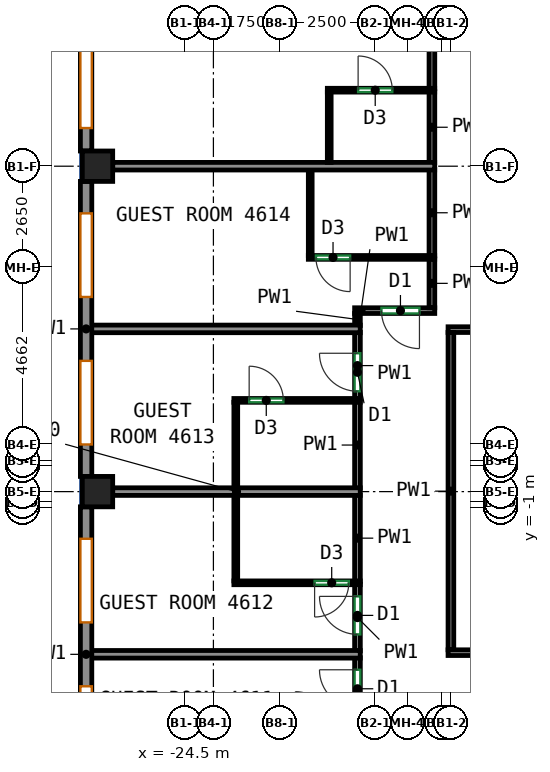
"""IFC4 building model, lengths in metres.
Left out: names, types, materials, properties, quantities, classifications, styles, units other than length and angle.
Written with IfcOpenShell. Run it as: python <this file> out.ifc"""

import sys

from ifc_helpers import new_model, si_unit, direction, frame, frame_2d, origin, origin_2d, place, context, subcontext, project, spatial, rectangle, extrude, source, transform, mapped, element, fill, save


model = new_model("IFC4")
c1 = context("Model", 3, precision=1e-05, world=origin(), true_north=direction((0.0, 1.0)))
c2 = subcontext(c1, "Body", "Model", "MODEL_VIEW")
j1 = project(units=[si_unit("LENGTHUNIT", "METRE"), si_unit("PLANEANGLEUNIT", "RADIAN")], contexts=[c1])
p1 = place(None, origin())
s1 = spatial("IfcSite", under=j1, at=p1, CompositionType="ELEMENT")
p2 = place(p1, origin())
s2 = spatial("IfcBuilding", under=s1, at=p2, CompositionType="ELEMENT")
p3 = place(p2, frame((0.0, 0.0, 192.3)))
s3 = spatial("IfcBuildingStorey", under=s2, at=p3, CompositionType="ELEMENT", Elevation=192.3)
m1 = source(origin(), c2, "Body", "SweptSolid", [
    extrude(rectangle(XDim=0.8, YDim=0.8, at=origin_2d()), origin(), (0.0, 0.0, 1.0), 3.0),
])
for number, where, z_axis, x_axis in (
    (1, (-26.8, -0.562, 0.0), (0.0, 0.0, 1.0), (1.0, 0.0, 0.0)),
    (2, (-26.8, 8.0, 0.0), (0.0, 0.0, 1.0), (1.0, 0.0, 0.0)),
):
    element("IfcColumn", number, at=place(p3, frame(where, z_axis=z_axis, x_axis=x_axis)), inside=s3, PredefinedType="COLUMN", context=c2, shape_type="MappedRepresentation", body=[
        mapped(m1, transform((0.0, 0.0, 0.0))),
    ])
m2 = source(origin(), c2, "Body", "SweptSolid", [
    extrude(rectangle(XDim=13.632, YDim=0.3, at=frame_2d((6.816, 0.0))), origin(), (0.0, 0.0, 1.0), 3.0),
])
p4 = place(p3, frame((-27.1, 22.032, 0.0), z_axis=(0.0, 0.0, 1.0), x_axis=(0.0, -1.0, 0.0)))
e3 = element("IfcWall", 3, at=p4, inside=s3, PredefinedType="SOLIDWALL", context=c2, shape_type="MappedRepresentation", body=[
    mapped(m2, transform((0.0, 0.0, 0.0))),
])
p5 = place(p4, frame((0.604, 0.0, 0.85)))
e4 = element("IfcOpeningElement", 4, at=p5, cuts=e3, PredefinedType="OPENING", context=c2, shape_type="SweptSolid", body=[
    extrude(rectangle(XDim=2.2, YDim=1.95, at=frame_2d((1.1, 0.975))), frame((0.0, 0.16, 0.0), z_axis=(0.0, -1.0, 0.0), x_axis=(1.0, 0.0, 0.0)), (0.0, 0.0, 1.0), 0.32),
])
p6 = place(p4, frame((4.012, 0.0, 0.85)))
e5 = element("IfcOpeningElement", 5, at=p6, cuts=e3, PredefinedType="OPENING", context=c2, shape_type="SweptSolid", body=[
    extrude(rectangle(XDim=2.2, YDim=1.95, at=frame_2d((1.1, 0.975))), frame((0.0, 0.16, 0.0), z_axis=(0.0, -1.0, 0.0), x_axis=(1.0, 0.0, 0.0)), (0.0, 0.0, 1.0), 0.32),
])
p7 = place(p4, frame((7.42, 0.0, 0.85)))
e6 = element("IfcOpeningElement", 6, at=p7, cuts=e3, PredefinedType="OPENING", context=c2, shape_type="SweptSolid", body=[
    extrude(rectangle(XDim=2.2, YDim=1.95, at=frame_2d((1.1, 0.975))), frame((0.0, 0.16, 0.0), z_axis=(0.0, -1.0, 0.0), x_axis=(1.0, 0.0, 0.0)), (0.0, 0.0, 1.0), 0.32),
])
p8 = place(p4, frame((10.828, 0.0, 0.85)))
e7 = element("IfcOpeningElement", 7, at=p8, cuts=e3, PredefinedType="OPENING", context=c2, shape_type="SweptSolid", body=[
    extrude(rectangle(XDim=2.2, YDim=1.95, at=frame_2d((1.1, 0.975))), frame((0.0, 0.16, 0.0), z_axis=(0.0, -1.0, 0.0), x_axis=(1.0, 0.0, 0.0)), (0.0, 0.0, 1.0), 0.32),
])
m3 = source(origin(), c2, "Body", "SweptSolid", [
    extrude(rectangle(XDim=7.763, YDim=0.3, at=frame_2d((3.881, 0.0))), origin(), (0.0, 0.0, 1.0), 3.0),
])
p9 = place(p3, frame((-27.1, 7.6, 0.0), z_axis=(0.0, 0.0, 1.0), x_axis=(0.0, -1.0, 0.0)))
e8 = element("IfcWall", 8, at=p9, inside=s3, PredefinedType="SOLIDWALL", context=c2, shape_type="MappedRepresentation", body=[
    mapped(m3, transform((0.0, 0.0, 0.0))),
])
p10 = place(p9, frame((0.841, 0.0, 0.85)))
e9 = element("IfcOpeningElement", 9, at=p10, cuts=e8, PredefinedType="OPENING", context=c2, shape_type="SweptSolid", body=[
    extrude(rectangle(XDim=2.2, YDim=1.95, at=frame_2d((1.1, 0.975))), frame((0.0, 0.16, 0.0), z_axis=(0.0, -1.0, 0.0), x_axis=(1.0, 0.0, 0.0)), (0.0, 0.0, 1.0), 0.32),
])
p11 = place(p9, frame((4.722, 0.0, 0.85)))
e10 = element("IfcOpeningElement", 10, at=p11, cuts=e8, PredefinedType="OPENING", context=c2, shape_type="SweptSolid", body=[
    extrude(rectangle(XDim=2.2, YDim=1.95, at=frame_2d((1.1, 0.975))), frame((0.0, 0.16, 0.0), z_axis=(0.0, -1.0, 0.0), x_axis=(1.0, 0.0, 0.0)), (0.0, 0.0, 1.0), 0.32),
])
p12 = place(p3, frame((-27.1, -0.962, 0.0), z_axis=(0.0, 0.0, 1.0), x_axis=(0.0, -1.0, 0.0)))
e11 = element("IfcWall", 11, at=p12, inside=s3, PredefinedType="SOLIDWALL", context=c2, shape_type="MappedRepresentation", body=[
    mapped(m3, transform((0.0, 0.0, 0.0))),
])
p13 = place(p12, frame((0.841, 0.0, 0.85)))
e12 = element("IfcOpeningElement", 12, at=p13, cuts=e11, PredefinedType="OPENING", context=c2, shape_type="SweptSolid", body=[
    extrude(rectangle(XDim=2.2, YDim=1.95, at=frame_2d((1.1, 0.975))), frame((0.0, 0.16, 0.0), z_axis=(0.0, -1.0, 0.0), x_axis=(1.0, 0.0, 0.0)), (0.0, 0.0, 1.0), 0.32),
])
p14 = place(p12, frame((4.722, 0.0, 0.85)))
e13 = element("IfcOpeningElement", 13, at=p14, cuts=e11, PredefinedType="OPENING", context=c2, shape_type="SweptSolid", body=[
    extrude(rectangle(XDim=2.2, YDim=1.95, at=frame_2d((1.1, 0.975))), frame((0.0, 0.16, 0.0), z_axis=(0.0, -1.0, 0.0), x_axis=(1.0, 0.0, 0.0)), (0.0, 0.0, 1.0), 0.32),
])
p15 = place(p3, frame((-19.959, -6.685, 0.0), z_axis=(0.0, 0.0, 1.0), x_axis=(0.0, 1.0, 0.0)))
e14 = element("IfcWall", 14, at=p15, inside=s3, PredefinedType="PARTITIONING", context=c2, shape_type="SweptSolid", body=[
    extrude(rectangle(XDim=1.752, YDim=0.15, at=frame_2d((0.876, 0.0))), origin(), (0.0, 0.0, 1.0), 3.0),
])
p16 = place(p15, frame((0.435, 0.0, 0.0)))
e15 = element("IfcOpeningElement", 15, at=p16, cuts=e14, PredefinedType="OPENING", context=c2, shape_type="SweptSolid", body=[
    extrude(rectangle(XDim=1.0, YDim=2.1, at=frame_2d((0.5, 1.05))), frame((0.0, 0.085, 0.0), z_axis=(0.0, -1.0, 0.0), x_axis=(1.0, 0.0, 0.0)), (0.0, 0.0, 1.0), 0.17),
])
p17 = place(p3, frame((-19.959, -4.753, 0.0), z_axis=(0.0, 0.0, 1.0), x_axis=(0.0, 1.0, 0.0)))
e16 = element("IfcWall", 16, at=p17, inside=s3, PredefinedType="PARTITIONING", context=c2, shape_type="SweptSolid", body=[
    extrude(rectangle(XDim=1.751, YDim=0.15, at=frame_2d((0.875, 0.0))), origin(), (0.0, 0.0, 1.0), 3.0),
])
p18 = place(p17, frame((0.434, 0.0, 0.0)))
e17 = element("IfcOpeningElement", 17, at=p18, cuts=e16, PredefinedType="OPENING", context=c2, shape_type="SweptSolid", body=[
    extrude(rectangle(XDim=1.0, YDim=2.1, at=frame_2d((0.5, 1.05))), frame((0.0, 0.085, 0.0), z_axis=(0.0, -1.0, 0.0), x_axis=(1.0, 0.0, 0.0)), (0.0, 0.0, 1.0), 0.17),
])
p19 = place(p3, frame((-19.959, -2.922, 0.0), z_axis=(0.0, 0.0, 1.0), x_axis=(0.0, 1.0, 0.0)))
e18 = element("IfcWall", 18, at=p19, inside=s3, PredefinedType="PARTITIONING", context=c2, shape_type="SweptSolid", body=[
    extrude(rectangle(XDim=2.27, YDim=0.15, at=frame_2d((1.135, 0.0))), origin(), (0.0, 0.0, 1.0), 3.0),
])
p20 = place(p3, frame((-19.959, 1.878, 0.0), z_axis=(0.0, 0.0, 1.0), x_axis=(0.0, 1.0, 0.0)))
e19 = element("IfcWall", 19, at=p20, inside=s3, PredefinedType="PARTITIONING", context=c2, shape_type="SweptSolid", body=[
    extrude(rectangle(XDim=1.751, YDim=0.15, at=frame_2d((0.875, 0.0))), origin(), (0.0, 0.0, 1.0), 3.0),
])
p21 = place(p20, frame((0.2, 0.0, 0.0)))
e20 = element("IfcOpeningElement", 20, at=p21, cuts=e19, PredefinedType="OPENING", context=c2, shape_type="SweptSolid", body=[
    extrude(rectangle(XDim=1.0, YDim=2.1, at=frame_2d((0.5, 1.05))), frame((0.0, 0.085, 0.0), z_axis=(0.0, -1.0, 0.0), x_axis=(1.0, 0.0, 0.0)), (0.0, 0.0, 1.0), 0.17),
])
p22 = place(p3, frame((-19.959, -0.472, 0.0), z_axis=(0.0, 0.0, 1.0), x_axis=(0.0, 1.0, 0.0)))
e21 = element("IfcWall", 21, at=p22, inside=s3, PredefinedType="PARTITIONING", context=c2, shape_type="SweptSolid", body=[
    extrude(rectangle(XDim=2.27, YDim=0.15, at=frame_2d((1.135, 0.0))), origin(), (0.0, 0.0, 1.0), 3.0),
])
p23 = place(p3, frame((-19.959, 3.809, 0.0), z_axis=(0.0, 0.0, 1.0), x_axis=(0.0, 1.0, 0.0)))
e22 = element("IfcWall", 22, at=p23, inside=s3, PredefinedType="PARTITIONING", context=c2, shape_type="SweptSolid", body=[
    extrude(rectangle(XDim=0.316, YDim=0.15, at=frame_2d((0.158, 0.0))), origin(), (0.0, 0.0, 1.0), 3.0),
])
p24 = place(p3, frame((-17.925, 4.2, 0.0), z_axis=(0.0, 0.0, 1.0), x_axis=(-1.0, 0.0, 0.0)))
e23 = element("IfcWall", 23, at=p24, inside=s3, PredefinedType="PARTITIONING", context=c2, shape_type="SweptSolid", body=[
    extrude(rectangle(XDim=2.109, YDim=0.15, at=frame_2d((1.054, 0.0))), origin(), (0.0, 0.0, 1.0), 3.0),
])
p25 = place(p24, frame((0.403, 0.0, 0.0)))
e24 = element("IfcOpeningElement", 24, at=p25, cuts=e23, PredefinedType="OPENING", context=c2, shape_type="SweptSolid", body=[
    extrude(rectangle(XDim=1.0, YDim=2.1, at=frame_2d((0.5, 1.05))), frame((0.0, 0.085, 0.0), z_axis=(0.0, -1.0, 0.0), x_axis=(1.0, 0.0, 0.0)), (0.0, 0.0, 1.0), 0.17),
])
p26 = place(p3, frame((-18.0, 4.275, 0.0), z_axis=(0.0, 0.0, 1.0), x_axis=(0.0, 1.0, 0.0)))
e25 = element("IfcWall", 25, at=p26, inside=s3, PredefinedType="PARTITIONING", context=c2, shape_type="SweptSolid", body=[
    extrude(rectangle(XDim=1.285, YDim=0.15, at=frame_2d((0.643, 0.0))), origin(), (0.0, 0.0, 1.0), 3.0),
])
p27 = place(p3, frame((-18.0, 5.64, 0.0), z_axis=(0.0, 0.0, 1.0), x_axis=(0.0, 1.0, 0.0)))
e26 = element("IfcWall", 26, at=p27, inside=s3, PredefinedType="PARTITIONING", context=c2, shape_type="SweptSolid", body=[
    extrude(rectangle(XDim=2.27, YDim=0.15, at=frame_2d((1.135, 0.0))), origin(), (0.0, 0.0, 1.0), 3.0),
])
p28 = place(p3, frame((-18.0, 10.04, 0.0), z_axis=(0.0, 0.0, 1.0), x_axis=(0.0, 1.0, 0.0)))
e27 = element("IfcWall", 27, at=p28, inside=s3, PredefinedType="PARTITIONING", context=c2, shape_type="SweptSolid", body=[
    extrude(rectangle(XDim=4.707, YDim=0.15, at=frame_2d((2.354, 0.0))), origin(), (0.0, 0.0, 1.0), 3.0),
])
p29 = place(p28, frame((3.206, 0.0, 0.0)))
e28 = element("IfcOpeningElement", 28, at=p29, cuts=e27, PredefinedType="OPENING", context=c2, shape_type="SweptSolid", body=[
    extrude(rectangle(XDim=1.0, YDim=2.1, at=frame_2d((0.5, 1.05))), frame((0.0, 0.085, 0.0), z_axis=(0.0, -1.0, 0.0), x_axis=(1.0, 0.0, 0.0)), (0.0, 0.0, 1.0), 0.17),
])
p30 = place(p3, frame((-18.0, 8.09, 0.0), z_axis=(0.0, 0.0, 1.0), x_axis=(0.0, 1.0, 0.0)))
e29 = element("IfcWall", 29, at=p30, inside=s3, PredefinedType="PARTITIONING", context=c2, shape_type="SweptSolid", body=[
    extrude(rectangle(XDim=1.87, YDim=0.15, at=frame_2d((0.935, 0.0))), origin(), (0.0, 0.0, 1.0), 3.0),
])
p31 = place(p3, frame((-17.575, 3.7, 0.0), z_axis=(0.0, 0.0, 1.0), x_axis=(1.0, 0.0, 0.0)))
e30 = element("IfcWall", 30, at=p31, inside=s3, PredefinedType="PARTITIONING", context=c2, shape_type="SweptSolid", body=[
    extrude(rectangle(XDim=33.85, YDim=0.15, at=frame_2d((16.925, 0.0))), origin(), (0.0, 0.0, 1.0), 3.0),
])
p32 = place(p31, frame((10.584, 0.0, 0.0)))
e31 = element("IfcOpeningElement", 31, at=p32, cuts=e30, PredefinedType="OPENING", context=c2, shape_type="SweptSolid", body=[
    extrude(rectangle(XDim=0.9, YDim=2.1, at=frame_2d((0.45, 1.05))), frame((0.0, 0.085, 0.0), z_axis=(0.0, -1.0, 0.0), x_axis=(1.0, 0.0, 0.0)), (0.0, 0.0, 1.0), 0.17),
])
p33 = place(p31, frame((16.175, 0.0, 0.0)))
e32 = element("IfcOpeningElement", 32, at=p33, cuts=e30, PredefinedType="OPENING", context=c2, shape_type="SweptSolid", body=[
    extrude(rectangle(XDim=0.9, YDim=2.1, at=frame_2d((0.45, 1.05))), frame((0.0, 0.085, 0.0), z_axis=(0.0, -1.0, 0.0), x_axis=(1.0, 0.0, 0.0)), (0.0, 0.0, 1.0), 0.17),
])
p34 = place(p31, frame((25.696, 0.0, 0.0)))
e33 = element("IfcOpeningElement", 33, at=p34, cuts=e30, PredefinedType="OPENING", context=c2, shape_type="SweptSolid", body=[
    extrude(rectangle(XDim=0.9, YDim=2.1, at=frame_2d((0.45, 1.05))), frame((0.0, 0.085, 0.0), z_axis=(0.0, -1.0, 0.0), x_axis=(1.0, 0.0, 0.0)), (0.0, 0.0, 1.0), 0.17),
])
p35 = place(p3, frame((-17.5, -4.725, 0.0), z_axis=(0.0, 0.0, 1.0), x_axis=(0.0, 1.0, 0.0)))
e34 = element("IfcWall", 34, at=p35, inside=s3, PredefinedType="PARTITIONING", context=c2, shape_type="SweptSolid", body=[
    extrude(rectangle(XDim=8.35, YDim=0.15, at=frame_2d((4.175, 0.0))), origin(), (0.0, 0.0, 1.0), 3.0),
])
p36 = place(p3, frame((-17.575, -4.8, 0.0), z_axis=(0.0, 0.0, 1.0), x_axis=(1.0, 0.0, 0.0)))
e35 = element("IfcWall", 35, at=p36, inside=s3, PredefinedType="PARTITIONING", context=c2, shape_type="SweptSolid", body=[
    extrude(rectangle(XDim=3.702, YDim=0.15, at=frame_2d((1.851, 0.0))), origin(), (0.0, 0.0, 1.0), 3.0),
])
p37 = place(p3, frame((-27.0, -4.843, 0.0), z_axis=(0.0, 0.0, 1.0), x_axis=(1.0, 0.0, 0.0)))
e36 = element("IfcWall", 36, at=p37, inside=s3, PredefinedType="PARTITIONING", context=c2, shape_type="SweptSolid", body=[
    extrude(rectangle(XDim=7.114, YDim=0.2, at=frame_2d((3.557, 0.0))), origin(), (0.0, 0.0, 1.0), 3.0),
])
p38 = place(p3, frame((-19.886, -2.962, 0.0), z_axis=(0.0, 0.0, 1.0), x_axis=(-1.0, 0.0, 0.0)))
e37 = element("IfcWall", 37, at=p38, inside=s3, PredefinedType="PARTITIONING", context=c2, shape_type="SweptSolid", body=[
    extrude(rectangle(XDim=3.325, YDim=0.1, at=frame_2d((1.663, 0.0))), origin(), (0.0, 0.0, 1.0), 3.0),
])
p39 = place(p38, frame((0.301, 0.0, 0.0)))
e38 = element("IfcOpeningElement", 38, at=p39, cuts=e37, PredefinedType="OPENING", context=c2, shape_type="SweptSolid", body=[
    extrude(rectangle(XDim=0.9, YDim=2.1, at=frame_2d((0.45, 1.05))), frame((0.0, 0.06, 0.0), z_axis=(0.0, -1.0, 0.0), x_axis=(1.0, 0.0, 0.0)), (0.0, 0.0, 1.0), 0.12),
])
p40 = place(p3, frame((-23.161, -2.912, 0.0), z_axis=(0.0, 0.0, 1.0), x_axis=(0.0, 1.0, 0.0)))
e39 = element("IfcWall", 39, at=p40, inside=s3, PredefinedType="PARTITIONING", context=c2, shape_type="SweptSolid", body=[
    extrude(rectangle(XDim=2.25, YDim=0.1, at=frame_2d((1.125, 0.0))), origin(), (0.0, 0.0, 1.0), 3.0),
])
p41 = place(p3, frame((-26.4, -0.562, 0.0), z_axis=(0.0, 0.0, 1.0), x_axis=(1.0, 0.0, 0.0)))
e40 = element("IfcWall", 40, at=p41, inside=s3, PredefinedType="PARTITIONING", context=c2, shape_type="SweptSolid", body=[
    extrude(rectangle(XDim=6.514, YDim=0.2, at=frame_2d((3.257, 0.0))), origin(), (0.0, 0.0, 1.0), 2.4),
])
p42 = place(p3, frame((-23.211, 1.838, 0.0), z_axis=(0.0, 0.0, 1.0), x_axis=(1.0, 0.0, 0.0)))
e41 = element("IfcWall", 41, at=p42, inside=s3, PredefinedType="PARTITIONING", context=c2, shape_type="SweptSolid", body=[
    extrude(rectangle(XDim=3.325, YDim=0.1, at=frame_2d((1.663, 0.0))), origin(), (0.0, 0.0, 1.0), 3.0),
])
p43 = place(p42, frame((0.402, 0.0, 0.0)))
e42 = element("IfcOpeningElement", 42, at=p43, cuts=e41, PredefinedType="OPENING", context=c2, shape_type="SweptSolid", body=[
    extrude(rectangle(XDim=0.9, YDim=2.1, at=frame_2d((0.45, 1.05))), frame((0.0, 0.06, 0.0), z_axis=(0.0, -1.0, 0.0), x_axis=(1.0, 0.0, 0.0)), (0.0, 0.0, 1.0), 0.12),
])
p44 = place(p3, frame((-23.161, -0.462, 0.0), z_axis=(0.0, 0.0, 1.0), x_axis=(0.0, 1.0, 0.0)))
e43 = element("IfcWall", 43, at=p44, inside=s3, PredefinedType="PARTITIONING", context=c2, shape_type="SweptSolid", body=[
    extrude(rectangle(XDim=2.25, YDim=0.1, at=frame_2d((1.125, 0.0))), origin(), (0.0, 0.0, 1.0), 3.0),
])
p45 = place(p3, frame((-27.0, 3.719, 0.0), z_axis=(0.0, 0.0, 1.0), x_axis=(1.0, 0.0, 0.0)))
e44 = element("IfcWall", 44, at=p45, inside=s3, PredefinedType="PARTITIONING", context=c2, shape_type="SweptSolid", body=[
    extrude(rectangle(XDim=7.114, YDim=0.2, at=frame_2d((3.557, 0.0))), origin(), (0.0, 0.0, 1.0), 3.0),
])
p46 = place(p3, frame((-17.927, 5.6, 0.0), z_axis=(0.0, 0.0, 1.0), x_axis=(-1.0, 0.0, 0.0)))
e45 = element("IfcWall", 45, at=p46, inside=s3, PredefinedType="PARTITIONING", context=c2, shape_type="SweptSolid", body=[
    extrude(rectangle(XDim=3.325, YDim=0.1, at=frame_2d((1.663, 0.0))), origin(), (0.0, 0.0, 1.0), 3.0),
])
p47 = place(p46, frame((2.225, 0.0, 0.0)))
e46 = element("IfcOpeningElement", 46, at=p47, cuts=e45, PredefinedType="OPENING", context=c2, shape_type="SweptSolid", body=[
    extrude(rectangle(XDim=0.9, YDim=2.1, at=frame_2d((0.45, 1.05))), frame((0.0, 0.06, 0.0), z_axis=(0.0, -1.0, 0.0), x_axis=(1.0, 0.0, 0.0)), (0.0, 0.0, 1.0), 0.12),
])
p48 = place(p3, frame((-21.202, 5.65, 0.0), z_axis=(0.0, 0.0, 1.0), x_axis=(0.0, 1.0, 0.0)))
e47 = element("IfcWall", 47, at=p48, inside=s3, PredefinedType="PARTITIONING", context=c2, shape_type="SweptSolid", body=[
    extrude(rectangle(XDim=2.25, YDim=0.1, at=frame_2d((1.125, 0.0))), origin(), (0.0, 0.0, 1.0), 3.0),
])
p49 = place(p3, frame((-26.4, 8.0, 0.0), z_axis=(0.0, 0.0, 1.0), x_axis=(1.0, 0.0, 0.0)))
e48 = element("IfcWall", 48, at=p49, inside=s3, PredefinedType="PARTITIONING", context=c2, shape_type="SweptSolid", body=[
    extrude(rectangle(XDim=8.473, YDim=0.2, at=frame_2d((4.236, 0.0))), origin(), (0.0, 0.0, 1.0), 3.0),
])
p50 = place(p3, frame((-20.752, 10.0, 0.0), z_axis=(0.0, 0.0, 1.0), x_axis=(1.0, 0.0, 0.0)))
e49 = element("IfcWall", 49, at=p50, inside=s3, PredefinedType="PARTITIONING", context=c2, shape_type="SweptSolid", body=[
    extrude(rectangle(XDim=2.825, YDim=0.1, at=frame_2d((1.413, 0.0))), origin(), (0.0, 0.0, 1.0), 3.0),
])
p51 = place(p50, frame((0.81, 0.0, 0.0)))
e50 = element("IfcOpeningElement", 50, at=p51, cuts=e49, PredefinedType="OPENING", context=c2, shape_type="SweptSolid", body=[
    extrude(rectangle(XDim=0.9, YDim=2.1, at=frame_2d((0.45, 1.05))), frame((0.0, 0.06, 0.0), z_axis=(0.0, -1.0, 0.0), x_axis=(1.0, 0.0, 0.0)), (0.0, 0.0, 1.0), 0.12),
])
p52 = place(p3, frame((-20.702, 8.1, 0.0), z_axis=(0.0, 0.0, 1.0), x_axis=(0.0, 1.0, 0.0)))
e51 = element("IfcWall", 51, at=p52, inside=s3, PredefinedType="PARTITIONING", context=c2, shape_type="SweptSolid", body=[
    extrude(rectangle(XDim=1.85, YDim=0.1, at=frame_2d((0.925, 0.0))), origin(), (0.0, 0.0, 1.0), 3.0),
])
p53 = place(p8, origin())
e52 = element("IfcWindow", 52, at=p53, inside=s3, PartitioningType="SINGLE_PANEL", PredefinedType="WINDOW", context=c2, shape_type="SweptSolid", body=[
    extrude(rectangle(XDim=2.2, YDim=1.95, at=frame_2d((1.1, 0.975))), frame((0.0, 0.03, 0.0), z_axis=(0.0, -1.0, 0.0), x_axis=(1.0, 0.0, 0.0)), (0.0, 0.0, 1.0), 0.06),
])
fill(e7, e52)
p54 = place(p10, origin())
e53 = element("IfcWindow", 53, at=p54, inside=s3, PartitioningType="SINGLE_PANEL", PredefinedType="WINDOW", context=c2, shape_type="SweptSolid", body=[
    extrude(rectangle(XDim=2.2, YDim=1.95, at=frame_2d((1.1, 0.975))), frame((0.0, 0.03, 0.0), z_axis=(0.0, -1.0, 0.0), x_axis=(1.0, 0.0, 0.0)), (0.0, 0.0, 1.0), 0.06),
])
fill(e9, e53)
p55 = place(p11, origin())
e54 = element("IfcWindow", 54, at=p55, inside=s3, PartitioningType="SINGLE_PANEL", PredefinedType="WINDOW", context=c2, shape_type="SweptSolid", body=[
    extrude(rectangle(XDim=2.2, YDim=1.95, at=frame_2d((1.1, 0.975))), frame((0.0, 0.03, 0.0), z_axis=(0.0, -1.0, 0.0), x_axis=(1.0, 0.0, 0.0)), (0.0, 0.0, 1.0), 0.06),
])
fill(e10, e54)
p56 = place(p13, origin())
e55 = element("IfcWindow", 55, at=p56, inside=s3, PartitioningType="SINGLE_PANEL", PredefinedType="WINDOW", context=c2, shape_type="SweptSolid", body=[
    extrude(rectangle(XDim=2.2, YDim=1.95, at=frame_2d((1.1, 0.975))), frame((0.0, 0.03, 0.0), z_axis=(0.0, -1.0, 0.0), x_axis=(1.0, 0.0, 0.0)), (0.0, 0.0, 1.0), 0.06),
])
fill(e12, e55)
p57 = place(p14, origin())
e56 = element("IfcWindow", 56, at=p57, inside=s3, PartitioningType="SINGLE_PANEL", PredefinedType="WINDOW", context=c2, shape_type="SweptSolid", body=[
    extrude(rectangle(XDim=2.2, YDim=1.95, at=frame_2d((1.1, 0.975))), frame((0.0, 0.03, 0.0), z_axis=(0.0, -1.0, 0.0), x_axis=(1.0, 0.0, 0.0)), (0.0, 0.0, 1.0), 0.06),
])
fill(e13, e56)
p58 = place(p16, origin())
e57 = element("IfcDoor", 57, at=p58, inside=s3, OperationType="SINGLE_SWING_RIGHT", PredefinedType="DOOR", context=c2, shape_type="SweptSolid", body=[
    extrude(rectangle(XDim=1.0, YDim=2.1, at=frame_2d((0.5, 1.05))), frame((0.0, 0.025, 0.0), z_axis=(0.0, -1.0, 0.0), x_axis=(1.0, 0.0, 0.0)), (0.0, 0.0, 1.0), 0.05),
])
fill(e15, e57)
p59 = place(p18, origin())
e58 = element("IfcDoor", 58, at=p59, inside=s3, OperationType="SINGLE_SWING_RIGHT", PredefinedType="DOOR", context=c2, shape_type="SweptSolid", body=[
    extrude(rectangle(XDim=1.0, YDim=2.1, at=frame_2d((0.5, 1.05))), frame((0.0, 0.025, 0.0), z_axis=(0.0, -1.0, 0.0), x_axis=(1.0, 0.0, 0.0)), (0.0, 0.0, 1.0), 0.05),
])
fill(e17, e58)
p60 = place(p39, origin())
e59 = element("IfcDoor", 59, at=p60, inside=s3, OperationType="SINGLE_SWING_RIGHT", PredefinedType="DOOR", context=c2, shape_type="SweptSolid", body=[
    extrude(rectangle(XDim=0.9, YDim=2.1, at=frame_2d((0.45, 1.05))), frame((0.0, 0.025, 0.0), z_axis=(0.0, -1.0, 0.0), x_axis=(1.0, 0.0, 0.0)), (0.0, 0.0, 1.0), 0.05),
])
fill(e38, e59)
p61 = place(p43, origin())
e60 = element("IfcDoor", 60, at=p61, inside=s3, OperationType="SINGLE_SWING_LEFT", PredefinedType="DOOR", context=c2, shape_type="SweptSolid", body=[
    extrude(rectangle(XDim=0.9, YDim=2.1, at=frame_2d((0.45, 1.05))), frame((0.0, 0.025, 0.0), z_axis=(0.0, -1.0, 0.0), x_axis=(1.0, 0.0, 0.0)), (0.0, 0.0, 1.0), 0.05),
])
fill(e42, e60)
p62 = place(p21, origin())
e61 = element("IfcDoor", 61, at=p62, inside=s3, OperationType="SINGLE_SWING_RIGHT", PredefinedType="DOOR", context=c2, shape_type="SweptSolid", body=[
    extrude(rectangle(XDim=1.0, YDim=2.1, at=frame_2d((0.5, 1.05))), frame((0.0, 0.025, 0.0), z_axis=(0.0, -1.0, 0.0), x_axis=(1.0, 0.0, 0.0)), (0.0, 0.0, 1.0), 0.05),
])
fill(e20, e61)
p63 = place(p25, origin())
e62 = element("IfcDoor", 62, at=p63, inside=s3, OperationType="SINGLE_SWING_LEFT", PredefinedType="DOOR", context=c2, shape_type="SweptSolid", body=[
    extrude(rectangle(XDim=1.0, YDim=2.1, at=frame_2d((0.5, 1.05))), frame((0.0, 0.025, 0.0), z_axis=(0.0, -1.0, 0.0), x_axis=(1.0, 0.0, 0.0)), (0.0, 0.0, 1.0), 0.05),
])
fill(e24, e62)
p64 = place(p47, origin())
e63 = element("IfcDoor", 63, at=p64, inside=s3, OperationType="SINGLE_SWING_LEFT", PredefinedType="DOOR", context=c2, shape_type="SweptSolid", body=[
    extrude(rectangle(XDim=0.9, YDim=2.1, at=frame_2d((0.45, 1.05))), frame((0.0, 0.025, 0.0), z_axis=(0.0, -1.0, 0.0), x_axis=(1.0, 0.0, 0.0)), (0.0, 0.0, 1.0), 0.05),
])
fill(e46, e63)
p65 = place(p51, origin())
e64 = element("IfcDoor", 64, at=p65, inside=s3, OperationType="SINGLE_SWING_LEFT", PredefinedType="DOOR", context=c2, shape_type="SweptSolid", body=[
    extrude(rectangle(XDim=0.9, YDim=2.1, at=frame_2d((0.45, 1.05))), frame((0.0, 0.025, 0.0), z_axis=(0.0, -1.0, 0.0), x_axis=(1.0, 0.0, 0.0)), (0.0, 0.0, 1.0), 0.05),
])
fill(e50, e64)
save(model, sys.argv[1])
